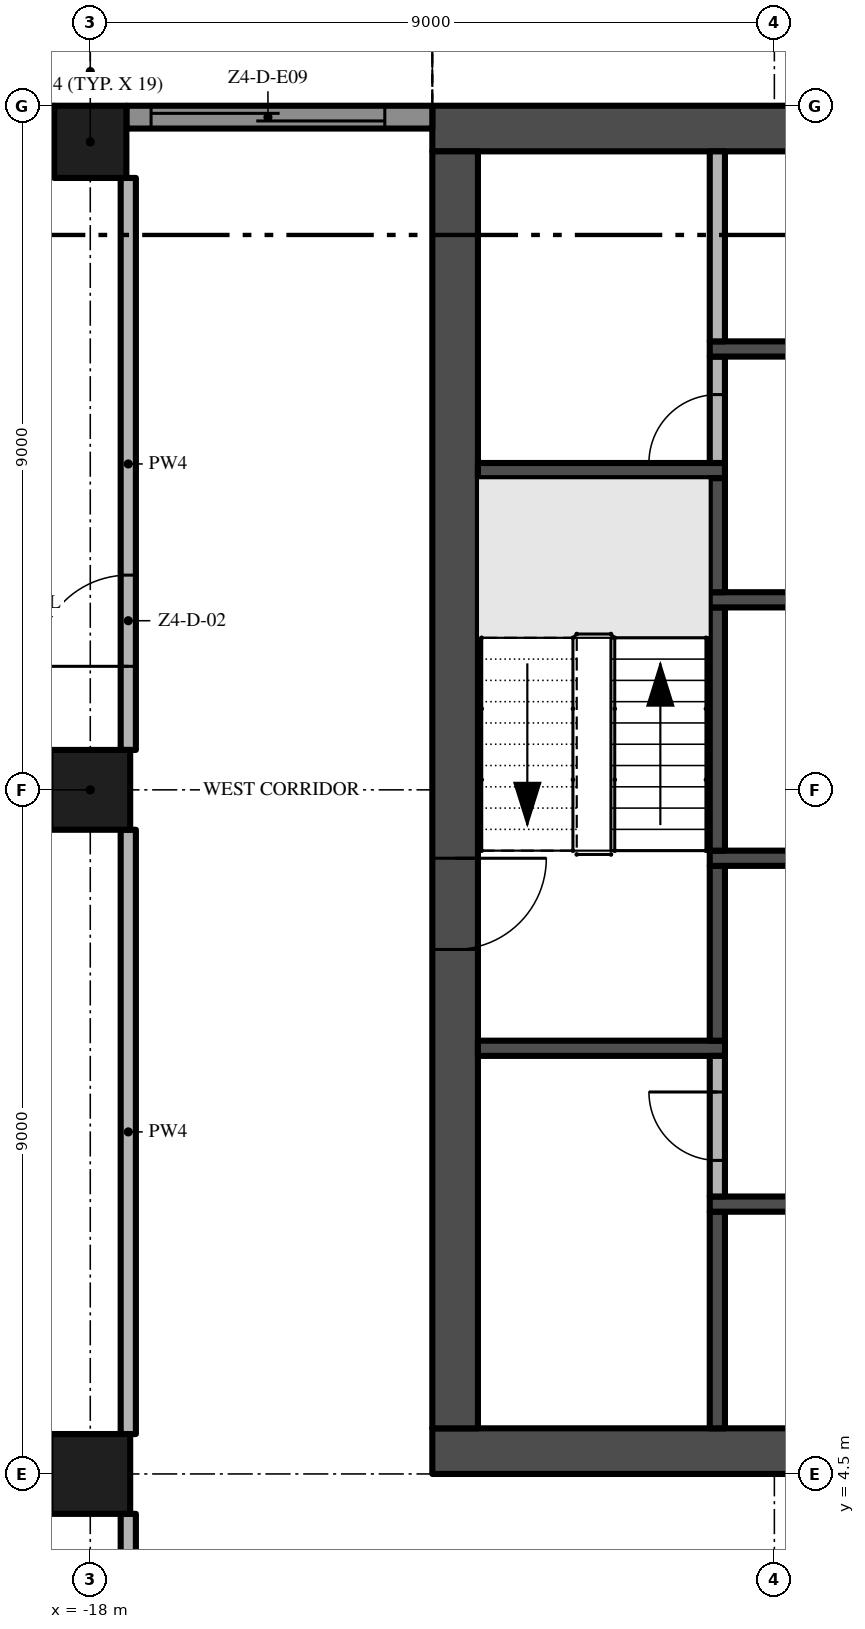
"""IFC4 building model, lengths in metres.
Left out: names, types, materials, properties, quantities, classifications, styles, units other than length and angle.
Written with IfcOpenShell. Run it as: python <this file> out.ifc"""

import sys

from ifc_helpers import new_model, si_unit, direction, frame, frame_2d, origin, origin_2d, place, context, subcontext, project, spatial, polyline, rectangle, outline, extrude, element, fill, save


model = new_model("IFC4")
c1 = context("Model", 3, precision=1e-05, world=origin(), true_north=direction((0.0, 1.0)))
c2 = subcontext(c1, "Body", "Model", "MODEL_VIEW")
j1 = project(units=[si_unit("LENGTHUNIT", "METRE"), si_unit("PLANEANGLEUNIT", "RADIAN")], contexts=[c1])
p1 = place(None, origin())
s1 = spatial("IfcSite", under=j1, at=p1, CompositionType="ELEMENT")
p2 = place(p1, origin())
s2 = spatial("IfcBuilding", under=s1, at=p2, CompositionType="ELEMENT")
p3 = place(p2, frame((0.0, 0.0, 218.6)))
s3 = spatial("IfcBuildingStorey", under=s2, at=p3, CompositionType="ELEMENT", Elevation=218.6)
p4 = place(p3, frame((-13.5, 4.8, -0.3), z_axis=(0.0, 0.0, 1.0), x_axis=(1.0, 0.0, 0.0)))
e1 = element("IfcWall", 1, at=p4, inside=s3, PredefinedType="SHEAR", context=c2, shape_type="SweptSolid", body=[
    extrude(rectangle(XDim=27.0, YDim=0.6, at=frame_2d((13.5, 0.0))), origin(), (0.0, 0.0, 1.0), 3.8),
])
p5 = place(p4, frame((12.0, 0.0, 0.3)))
e2 = element("IfcOpeningElement", 2, at=p5, cuts=e1, PredefinedType="OPENING", context=c2, shape_type="SweptSolid", body=[
    extrude(rectangle(XDim=3.0, YDim=2.4, at=frame_2d((1.5, 1.2))), frame((0.0, 0.31, 0.0), z_axis=(0.0, -1.0, 0.0), x_axis=(1.0, 0.0, 0.0)), (0.0, 0.0, 1.0), 0.62),
])
p6 = place(p4, frame((4.9, 0.0, 0.3)))
e3 = element("IfcOpeningElement", 3, at=p6, cuts=e1, PredefinedType="OPENING", context=c2, shape_type="SweptSolid", body=[
    extrude(rectangle(XDim=1.2, YDim=2.2, at=frame_2d((0.6, 1.1))), frame((0.0, 0.31, 0.0), z_axis=(0.0, -1.0, 0.0), x_axis=(1.0, 0.0, 0.0)), (0.0, 0.0, 1.0), 0.62),
])
p7 = place(p4, frame((20.75, 0.0, 0.3)))
e4 = element("IfcOpeningElement", 4, at=p7, cuts=e1, PredefinedType="OPENING", context=c2, shape_type="SweptSolid", body=[
    extrude(rectangle(XDim=1.5, YDim=2.2, at=frame_2d((0.75, 1.1))), frame((0.0, 0.31, 0.0), z_axis=(0.0, -1.0, 0.0), x_axis=(1.0, 0.0, 0.0)), (0.0, 0.0, 1.0), 0.62),
])
p8 = place(p4, frame((17.4, 0.0, 0.3)))
e5 = element("IfcOpeningElement", 5, at=p8, cuts=e1, PredefinedType="OPENING", context=c2, shape_type="SweptSolid", body=[
    extrude(rectangle(XDim=1.2, YDim=2.2, at=frame_2d((0.6, 1.1))), frame((0.0, 0.31, 0.0), z_axis=(0.0, -1.0, 0.0), x_axis=(1.0, 0.0, 0.0)), (0.0, 0.0, 1.0), 0.62),
])
p9 = place(p3, frame((13.5, 22.2, -0.3), z_axis=(0.0, 0.0, 1.0), x_axis=(-1.0, 0.0, 0.0)))
e6 = element("IfcWall", 6, at=p9, inside=s3, PredefinedType="SHEAR", context=c2, shape_type="SweptSolid", body=[
    extrude(rectangle(XDim=27.0, YDim=0.6, at=frame_2d((13.5, 0.0))), origin(), (0.0, 0.0, 1.0), 3.8),
])
p10 = place(p3, frame((-13.2, 21.9, -0.3), z_axis=(0.0, 0.0, 1.0), x_axis=(0.0, -1.0, 0.0)))
e7 = element("IfcWall", 7, at=p10, inside=s3, PredefinedType="SHEAR", context=c2, shape_type="SweptSolid", body=[
    extrude(rectangle(XDim=16.8, YDim=0.6, at=frame_2d((8.4, 0.0))), origin(), (0.0, 0.0, 1.0), 3.8),
])
p11 = place(p10, frame((9.3, 0.0, 0.3)))
e8 = element("IfcOpeningElement", 8, at=p11, cuts=e7, PredefinedType="OPENING", context=c2, shape_type="SweptSolid", body=[
    extrude(rectangle(XDim=1.2, YDim=2.2, at=frame_2d((0.6, 1.1))), frame((0.0, 0.31, 0.0), z_axis=(0.0, -1.0, 0.0), x_axis=(1.0, 0.0, 0.0)), (0.0, 0.0, 1.0), 0.62),
])
p12 = place(p3, frame((-18.0, 13.5, 0.0), z_axis=(0.0, 0.0, 1.0), x_axis=(1.0, 0.0, 0.0)))
e9 = element("IfcColumn", 9, at=p12, inside=s3, PredefinedType="COLUMN", context=c2, shape_type="SweptSolid", body=[
    extrude(rectangle(XDim=1.05, YDim=1.05, at=origin_2d()), origin(), (0.0, 0.0, 1.0), 3.5),
])
p13 = place(p3, frame((-18.0, 22.025, 0.0), z_axis=(0.0, 0.0, 1.0), x_axis=(1.0, 0.0, 0.0)))
e10 = element("IfcColumn", 10, at=p13, inside=s3, PredefinedType="COLUMN", context=c2, shape_type="SweptSolid", body=[
    extrude(rectangle(XDim=0.95, YDim=0.95, at=origin_2d()), origin(), (0.0, 0.0, 1.0), 3.5),
])
p14 = place(p3, frame((-18.0, 4.5, 0.0), z_axis=(0.0, 0.0, 1.0), x_axis=(1.0, 0.0, 0.0)))
e11 = element("IfcColumn", 11, at=p14, inside=s3, PredefinedType="COLUMN", context=c2, shape_type="SweptSolid", body=[
    extrude(rectangle(XDim=1.05, YDim=1.05, at=origin_2d()), origin(), (0.0, 0.0, 1.0), 3.5),
])
p15 = place(p3, frame((-17.525, 22.35, 0.0), z_axis=(0.0, 0.0, 1.0), x_axis=(1.0, 0.0, 0.0)))
e12 = element("IfcWall", 12, at=p15, inside=s3, PredefinedType="SOLIDWALL", context=c2, shape_type="SweptSolid", body=[
    extrude(rectangle(XDim=4.025, YDim=0.3, at=frame_2d((2.013, 0.0))), origin(), (0.0, 0.0, 1.0), 3.5),
])
p16 = place(p15, frame((0.325, 0.0, 0.0)))
e13 = element("IfcOpeningElement", 13, at=p16, cuts=e12, PredefinedType="OPENING", context=c2, shape_type="SweptSolid", body=[
    extrude(rectangle(XDim=3.075, YDim=2.4, at=frame_2d((1.538, 1.2))), frame((0.0, 0.16, 0.0), z_axis=(0.0, -1.0, 0.0), x_axis=(1.0, 0.0, 0.0)), (0.0, 0.0, 1.0), 0.32),
])
p17 = place(p3, frame((-22.5, 22.35, 0.0), z_axis=(0.0, 0.0, 1.0), x_axis=(1.0, 0.0, 0.0)))
e14 = element("IfcWall", 14, at=p17, inside=s3, PredefinedType="SOLIDWALL", context=c2, shape_type="SweptSolid", body=[
    extrude(rectangle(XDim=4.025, YDim=0.3, at=frame_2d((2.013, 0.0))), origin(), (0.0, 0.0, 1.0), 3.5),
])
p18 = place(p17, frame((0.625, 0.0, 0.45)))
e15 = element("IfcOpeningElement", 15, at=p18, cuts=e14, PredefinedType="OPENING", context=c2, shape_type="SweptSolid", body=[
    extrude(rectangle(XDim=3.075, YDim=2.65, at=frame_2d((1.538, 1.325))), frame((0.0, 0.16, 0.0), z_axis=(0.0, -1.0, 0.0), x_axis=(1.0, 0.0, 0.0)), (0.0, 0.0, 1.0), 0.32),
])
p19 = place(p3, origin())
e16 = element("IfcWall", 16, at=p19, inside=s3, PredefinedType="USERDEFINED", context=c2, shape_type="SweptSolid", body=[
    extrude(outline(polyline([(-13.5, 25.5), (-15.0, 25.271), (-16.5, 24.671), (-18.0, 23.929), (-19.5, 23.329), (-21.0, 23.1), (-22.5, 23.329), (-22.538, 23.082), (-21.0, 22.847), (-19.434, 23.086), (-17.898, 23.701), (-16.398, 24.442), (-14.934, 25.028), (-13.462, 25.253), (-13.5, 25.5)])), origin(), (0.0, 0.0, 1.0), 0.9),
])
for number, where, z_axis, x_axis in (
    (17, (-12.9, 10.1, 0.0), (0.0, 0.0, 1.0), (1.0, 0.0, 0.0)),
    (18, (-12.9, 17.7, 0.0), (0.0, 0.0, 1.0), (1.0, 0.0, 0.0)),
):
    element("IfcWall", number, at=place(p3, frame(where, z_axis=z_axis, x_axis=x_axis)), inside=s3, PredefinedType="SHEAR", context=c2, shape_type="SweptSolid", body=[
        extrude(rectangle(XDim=3.25, YDim=0.2, at=frame_2d((1.625, 0.0))), origin(), (0.0, 0.0, 1.0), 3.5),
    ])
p20 = place(p3, frame((-9.75, 5.1, 0.0), z_axis=(0.0, 0.0, 1.0), x_axis=(0.0, 1.0, 0.0)))
e19 = element("IfcWall", 19, at=p20, inside=s3, PredefinedType="SHEAR", context=c2, shape_type="SweptSolid", body=[
    extrude(rectangle(XDim=2.85, YDim=0.2, at=frame_2d((1.425, 0.0))), origin(), (0.0, 0.0, 1.0), 3.5),
])
p21 = place(p3, frame((-9.85, 8.05, 0.0), z_axis=(0.0, 0.0, 1.0), x_axis=(1.0, 0.0, 0.0)))
e20 = element("IfcWall", 20, at=p21, inside=s3, PredefinedType="SHEAR", context=c2, shape_type="SweptSolid", body=[
    extrude(rectangle(XDim=8.35, YDim=0.2, at=frame_2d((4.175, 0.0))), origin(), (0.0, 0.0, 1.0), 3.5),
])
p22 = place(p3, frame((-9.75, 8.15, 0.0), z_axis=(0.0, 0.0, 1.0), x_axis=(0.0, 1.0, 0.0)))
e21 = element("IfcWall", 21, at=p22, inside=s3, PredefinedType="PARTITIONING", context=c2, shape_type="SweptSolid", body=[
    extrude(rectangle(XDim=1.85, YDim=0.2, at=frame_2d((0.925, 0.0))), origin(), (0.0, 0.0, 1.0), 3.5),
])
p23 = place(p22, frame((0.475, 0.0, 0.0)))
e22 = element("IfcOpeningElement", 22, at=p23, cuts=e21, PredefinedType="OPENING", context=c2, shape_type="SweptSolid", body=[
    extrude(rectangle(XDim=0.9, YDim=2.1, at=frame_2d((0.45, 1.05))), frame((0.0, 0.11, 0.0), z_axis=(0.0, -1.0, 0.0), x_axis=(1.0, 0.0, 0.0)), (0.0, 0.0, 1.0), 0.22),
])
p24 = place(p3, frame((-9.75, 10.2, 0.0), z_axis=(0.0, 0.0, 1.0), x_axis=(0.0, 1.0, 0.0)))
e23 = element("IfcWall", 23, at=p24, inside=s3, PredefinedType="SHEAR", context=c2, shape_type="SweptSolid", body=[
    extrude(rectangle(XDim=2.3, YDim=0.2, at=frame_2d((1.15, 0.0))), origin(), (0.0, 0.0, 1.0), 3.5),
])
p25 = place(p3, frame((-9.85, 12.6, 0.0), z_axis=(0.0, 0.0, 1.0), x_axis=(1.0, 0.0, 0.0)))
e24 = element("IfcWall", 24, at=p25, inside=s3, PredefinedType="SHEAR", context=c2, shape_type="SweptSolid", body=[
    extrude(rectangle(XDim=3.475, YDim=0.2, at=frame_2d((1.738, 0.0))), origin(), (0.0, 0.0, 1.0), 3.5),
])
p26 = place(p3, frame((-9.75, 12.7, 0.0), z_axis=(0.0, 0.0, 1.0), x_axis=(0.0, 1.0, 0.0)))
e25 = element("IfcWall", 25, at=p26, inside=s3, PredefinedType="SHEAR", context=c2, shape_type="SweptSolid", body=[
    extrude(rectangle(XDim=3.2, YDim=0.2, at=frame_2d((1.6, 0.0))), origin(), (0.0, 0.0, 1.0), 3.5),
])
p27 = place(p3, frame((-1.5, 16.0, 0.0), z_axis=(0.0, 0.0, 1.0), x_axis=(-1.0, 0.0, 0.0)))
e26 = element("IfcWall", 26, at=p27, inside=s3, PredefinedType="SHEAR", context=c2, shape_type="SweptSolid", body=[
    extrude(rectangle(XDim=8.35, YDim=0.2, at=frame_2d((4.175, 0.0))), origin(), (0.0, 0.0, 1.0), 3.5),
])
p28 = place(p27, frame((6.162, 0.0, 0.0)))
e27 = element("IfcOpeningElement", 27, at=p28, cuts=e26, PredefinedType="OPENING", context=c2, shape_type="SweptSolid", body=[
    extrude(rectangle(XDim=0.9, YDim=2.1, at=frame_2d((0.45, 1.05))), frame((0.0, 0.11, 0.0), z_axis=(0.0, -1.0, 0.0), x_axis=(1.0, 0.0, 0.0)), (0.0, 0.0, 1.0), 0.22),
])
p29 = place(p3, frame((-9.75, 16.1, 0.0), z_axis=(0.0, 0.0, 1.0), x_axis=(0.0, 1.0, 0.0)))
e28 = element("IfcWall", 28, at=p29, inside=s3, PredefinedType="SHEAR", context=c2, shape_type="SweptSolid", body=[
    extrude(rectangle(XDim=1.5, YDim=0.2, at=frame_2d((0.75, 0.0))), origin(), (0.0, 0.0, 1.0), 3.5),
])
p30 = place(p3, frame((-9.75, 17.8, 0.0), z_axis=(0.0, 0.0, 1.0), x_axis=(0.0, 1.0, 0.0)))
e29 = element("IfcWall", 29, at=p30, inside=s3, PredefinedType="PARTITIONING", context=c2, shape_type="SweptSolid", body=[
    extrude(rectangle(XDim=1.4, YDim=0.2, at=frame_2d((0.7, 0.0))), origin(), (0.0, 0.0, 1.0), 3.5),
])
p31 = place(p30, origin())
e30 = element("IfcOpeningElement", 30, at=p31, cuts=e29, PredefinedType="OPENING", context=c2, shape_type="SweptSolid", body=[
    extrude(rectangle(XDim=0.9, YDim=2.1, at=frame_2d((0.45, 1.05))), frame((0.0, 0.11, 0.0), z_axis=(0.0, -1.0, 0.0), x_axis=(1.0, 0.0, 0.0)), (0.0, 0.0, 1.0), 0.22),
])
p32 = place(p3, frame((-9.85, 19.3, 0.0), z_axis=(0.0, 0.0, 1.0), x_axis=(1.0, 0.0, 0.0)))
e31 = element("IfcWall", 31, at=p32, inside=s3, PredefinedType="SHEAR", context=c2, shape_type="SweptSolid", body=[
    extrude(rectangle(XDim=19.7, YDim=0.2, at=frame_2d((9.85, 0.0))), origin(), (0.0, 0.0, 1.0), 3.5),
])
p33 = place(p32, frame((10.519, 0.0, 0.0)))
e32 = element("IfcOpeningElement", 32, at=p33, cuts=e31, PredefinedType="OPENING", context=c2, shape_type="SweptSolid", body=[
    extrude(rectangle(XDim=1.1, YDim=2.1, at=frame_2d((0.55, 1.05))), frame((0.0, 0.11, 0.0), z_axis=(0.0, -1.0, 0.0), x_axis=(1.0, 0.0, 0.0)), (0.0, 0.0, 1.0), 0.22),
])
p34 = place(p32, frame((12.956, 0.0, 0.0)))
e33 = element("IfcOpeningElement", 33, at=p34, cuts=e31, PredefinedType="OPENING", context=c2, shape_type="SweptSolid", body=[
    extrude(rectangle(XDim=1.1, YDim=2.1, at=frame_2d((0.55, 1.05))), frame((0.0, 0.11, 0.0), z_axis=(0.0, -1.0, 0.0), x_axis=(1.0, 0.0, 0.0)), (0.0, 0.0, 1.0), 0.22),
])
p35 = place(p32, frame((15.394, 0.0, 0.0)))
e34 = element("IfcOpeningElement", 34, at=p35, cuts=e31, PredefinedType="OPENING", context=c2, shape_type="SweptSolid", body=[
    extrude(rectangle(XDim=1.1, YDim=2.1, at=frame_2d((0.55, 1.05))), frame((0.0, 0.11, 0.0), z_axis=(0.0, -1.0, 0.0), x_axis=(1.0, 0.0, 0.0)), (0.0, 0.0, 1.0), 0.22),
])
p36 = place(p32, frame((17.831, 0.0, 0.0)))
e35 = element("IfcOpeningElement", 35, at=p36, cuts=e31, PredefinedType="OPENING", context=c2, shape_type="SweptSolid", body=[
    extrude(rectangle(XDim=1.1, YDim=2.1, at=frame_2d((0.55, 1.05))), frame((0.0, 0.11, 0.0), z_axis=(0.0, -1.0, 0.0), x_axis=(1.0, 0.0, 0.0)), (0.0, 0.0, 1.0), 0.22),
])
p37 = place(p32, frame((3.306, 0.0, 0.0)))
e36 = element("IfcOpeningElement", 36, at=p37, cuts=e31, PredefinedType="OPENING", context=c2, shape_type="SweptSolid", body=[
    extrude(rectangle(XDim=0.9, YDim=2.1, at=frame_2d((0.45, 1.05))), frame((0.0, 0.11, 0.0), z_axis=(0.0, -1.0, 0.0), x_axis=(1.0, 0.0, 0.0)), (0.0, 0.0, 1.0), 0.22),
])
p38 = place(p32, frame((8.181, 0.0, 0.0)))
e37 = element("IfcOpeningElement", 37, at=p38, cuts=e31, PredefinedType="OPENING", context=c2, shape_type="SweptSolid", body=[
    extrude(rectangle(XDim=0.9, YDim=2.1, at=frame_2d((0.45, 1.05))), frame((0.0, 0.11, 0.0), z_axis=(0.0, -1.0, 0.0), x_axis=(1.0, 0.0, 0.0)), (0.0, 0.0, 1.0), 0.22),
])
p39 = place(p3, frame((-9.75, 19.4, 0.0), z_axis=(0.0, 0.0, 1.0), x_axis=(0.0, 1.0, 0.0)))
e38 = element("IfcWall", 38, at=p39, inside=s3, PredefinedType="PARTITIONING", context=c2, shape_type="SweptSolid", body=[
    extrude(rectangle(XDim=2.5, YDim=0.2, at=frame_2d((1.25, 0.0))), origin(), (0.0, 0.0, 1.0), 3.5),
])
p40 = place(p3, frame((-17.5, -0.2, 0.0), z_axis=(0.0, 0.0, 1.0), x_axis=(0.0, 1.0, 0.0)))
e39 = element("IfcWall", 39, at=p40, inside=s3, PredefinedType="PARTITIONING", context=c2, shape_type="SweptSolid", body=[
    extrude(rectangle(XDim=4.175, YDim=0.2, at=frame_2d((2.087, 0.0))), origin(), (0.0, 0.0, 1.0), 3.5),
])
p41 = place(p3, frame((-17.5, 5.025, 0.0), z_axis=(0.0, 0.0, 1.0), x_axis=(0.0, 1.0, 0.0)))
e40 = element("IfcWall", 40, at=p41, inside=s3, PredefinedType="PARTITIONING", context=c2, shape_type="SweptSolid", body=[
    extrude(rectangle(XDim=7.95, YDim=0.2, at=frame_2d((3.975, 0.0))), origin(), (0.0, 0.0, 1.0), 3.5),
])
p42 = place(p3, frame((-17.5, 14.025, 0.0), z_axis=(0.0, 0.0, 1.0), x_axis=(0.0, 1.0, 0.0)))
e41 = element("IfcWall", 41, at=p42, inside=s3, PredefinedType="PARTITIONING", context=c2, shape_type="SweptSolid", body=[
    extrude(rectangle(XDim=7.525, YDim=0.2, at=frame_2d((3.763, 0.0))), origin(), (0.0, 0.0, 1.0), 3.5),
])
p43 = place(p42, frame((1.1, 0.0, 0.0)))
e42 = element("IfcOpeningElement", 42, at=p43, cuts=e41, PredefinedType="OPENING", context=c2, shape_type="SweptSolid", body=[
    extrude(rectangle(XDim=1.2, YDim=2.4, at=frame_2d((0.6, 1.2))), frame((0.0, 0.11, 0.0), z_axis=(0.0, -1.0, 0.0), x_axis=(1.0, 0.0, 0.0)), (0.0, 0.0, 1.0), 0.22),
])
p44 = place(p16, origin())
e43 = element("IfcDoor", 43, at=p44, inside=s3, OperationType="SINGLE_SWING_LEFT", PredefinedType="DOOR", context=c2, shape_type="SweptSolid", body=[
    extrude(rectangle(XDim=3.075, YDim=2.4, at=frame_2d((1.538, 1.2))), frame((0.0, 0.025, 0.0), z_axis=(0.0, -1.0, 0.0), x_axis=(1.0, 0.0, 0.0)), (0.0, 0.0, 1.0), 0.05),
])
fill(e13, e43)
p45 = place(p11, frame((1.2, 0.0, 0.0), z_axis=(0.0, 0.0, 1.0), x_axis=(-1.0, 0.0, 0.0)))
e44 = element("IfcDoor", 44, at=p45, inside=s3, OperationType="SINGLE_SWING_RIGHT", PredefinedType="DOOR", context=c2, shape_type="SweptSolid", body=[
    extrude(rectangle(XDim=1.2, YDim=2.2, at=frame_2d((0.6, 1.1))), frame((0.0, 0.025, 0.0), z_axis=(0.0, -1.0, 0.0), x_axis=(1.0, 0.0, 0.0)), (0.0, 0.0, 1.0), 0.05),
])
fill(e8, e44)
p46 = place(p31, origin())
e45 = element("IfcDoor", 45, at=p46, inside=s3, OperationType="SINGLE_SWING_LEFT", PredefinedType="DOOR", context=c2, shape_type="SweptSolid", body=[
    extrude(rectangle(XDim=0.9, YDim=2.1, at=frame_2d((0.45, 1.05))), frame((0.0, 0.025, 0.0), z_axis=(0.0, -1.0, 0.0), x_axis=(1.0, 0.0, 0.0)), (0.0, 0.0, 1.0), 0.05),
])
fill(e30, e45)
p47 = place(p23, origin())
e46 = element("IfcDoor", 46, at=p47, inside=s3, OperationType="SINGLE_SWING_RIGHT", PredefinedType="DOOR", context=c2, shape_type="SweptSolid", body=[
    extrude(rectangle(XDim=0.9, YDim=2.1, at=frame_2d((0.45, 1.05))), frame((0.0, 0.025, 0.0), z_axis=(0.0, -1.0, 0.0), x_axis=(1.0, 0.0, 0.0)), (0.0, 0.0, 1.0), 0.05),
])
fill(e22, e46)
p48 = place(p43, origin())
e47 = element("IfcDoor", 47, at=p48, inside=s3, OperationType="SINGLE_SWING_LEFT", PredefinedType="DOOR", context=c2, shape_type="SweptSolid", body=[
    extrude(rectangle(XDim=1.2, YDim=2.4, at=frame_2d((0.6, 1.2))), frame((0.0, 0.025, 0.0), z_axis=(0.0, -1.0, 0.0), x_axis=(1.0, 0.0, 0.0)), (0.0, 0.0, 1.0), 0.05),
])
fill(e42, e47)
save(model, sys.argv[1])
